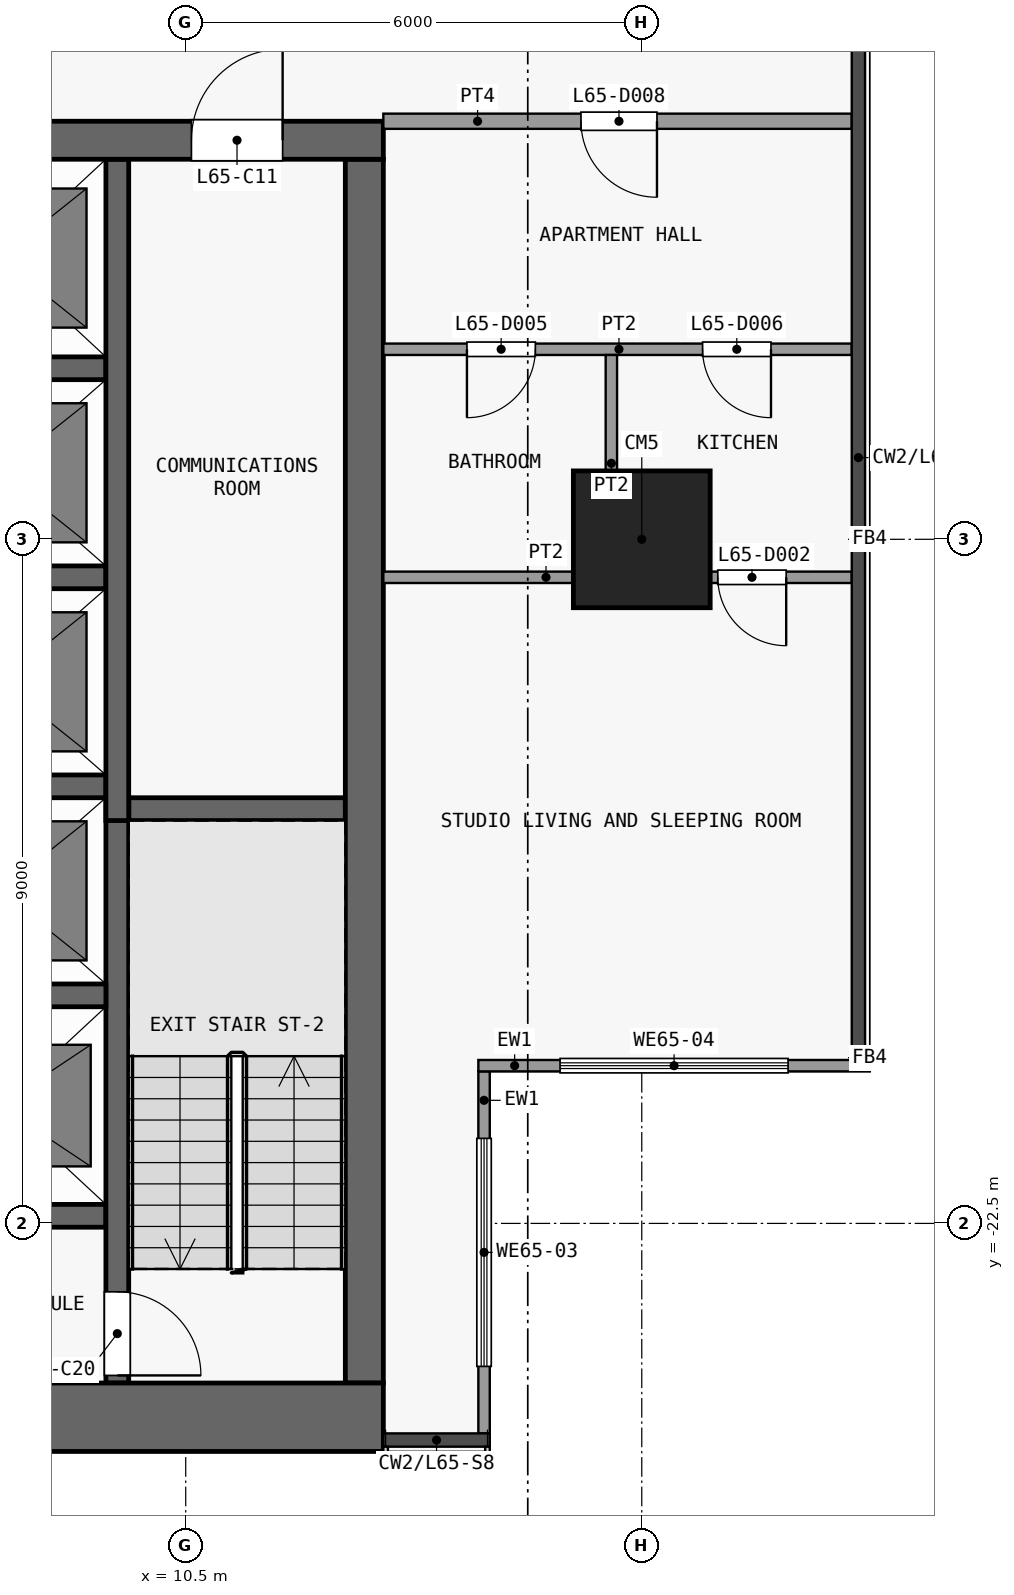
"""IFC4 building model, lengths in metres.
Left out: names, types, materials, properties, quantities, classifications, styles, units other than length and angle.
Written with IfcOpenShell. Run it as: python <this file> out.ifc"""

import sys

from ifc_helpers import new_model, si_unit, direction, frame, frame_2d, origin, origin_2d, place, context, subcontext, project, spatial, rectangle, extrude, element, fill, save


model = new_model("IFC4")
c1 = context("Model", 3, precision=1e-05, world=origin(), true_north=direction((0.0, 1.0)))
c2 = subcontext(c1, "Body", "Model", "MODEL_VIEW")
j1 = project(units=[si_unit("LENGTHUNIT", "METRE"), si_unit("PLANEANGLEUNIT", "RADIAN")], contexts=[c1])
p1 = place(None, origin())
s1 = spatial("IfcSite", under=j1, at=p1, CompositionType="ELEMENT")
p2 = place(p1, origin())
s2 = spatial("IfcBuilding", under=s1, at=p2, CompositionType="ELEMENT")
p3 = place(p2, frame((0.0, 0.0, 259.1)))
s3 = spatial("IfcBuildingStorey", under=s2, at=p3, CompositionType="ELEMENT", Elevation=259.1)
p4 = place(p3, frame((16.5, -13.5, 0.0), z_axis=(0.0, 0.0, 1.0), x_axis=(1.0, 0.0, 0.0)))
e1 = element("IfcColumn", 1, at=p4, inside=s3, PredefinedType="COLUMN", context=c2, shape_type="SweptSolid", body=[
    extrude(rectangle(XDim=1.8, YDim=1.8, at=origin_2d()), origin(), (0.0, 0.0, 1.0), 3.6),
])
p5 = place(p3, frame((-13.1, -25.05, 0.0), z_axis=(0.0, 0.0, 1.0), x_axis=(1.0, 0.0, 0.0)))
e2 = element("IfcWall", 2, at=p5, inside=s3, PredefinedType="SHEAR", context=c2, shape_type="SweptSolid", body=[
    extrude(rectangle(XDim=26.2, YDim=0.9, at=frame_2d((13.1, 0.0))), origin(), (0.0, 0.0, 1.0), 3.3),
])
p6 = place(p3, frame((-13.1, -8.25, 0.0), z_axis=(0.0, 0.0, 1.0), x_axis=(1.0, 0.0, 0.0)))
e3 = element("IfcWall", 3, at=p6, inside=s3, PredefinedType="SHEAR", context=c2, shape_type="SweptSolid", body=[
    extrude(rectangle(XDim=26.2, YDim=0.5, at=frame_2d((13.1, 0.0))), origin(), (0.0, 0.0, 1.0), 3.3),
])
p7 = place(p6, frame((7.4, 0.0, 0.0)))
e4 = element("IfcOpeningElement", 4, at=p7, cuts=e3, PredefinedType="OPENING", context=c2, shape_type="SweptSolid", body=[
    extrude(rectangle(XDim=1.8, YDim=2.1, at=frame_2d((0.9, 1.05))), frame((0.0, 0.26, 0.0), z_axis=(0.0, -1.0, 0.0), x_axis=(1.0, 0.0, 0.0)), (0.0, 0.0, 1.0), 0.52),
])
p8 = place(p6, frame((17.0, 0.0, 0.0)))
e5 = element("IfcOpeningElement", 5, at=p8, cuts=e3, PredefinedType="OPENING", context=c2, shape_type="SweptSolid", body=[
    extrude(rectangle(XDim=1.8, YDim=2.1, at=frame_2d((0.9, 1.05))), frame((0.0, 0.26, 0.0), z_axis=(0.0, -1.0, 0.0), x_axis=(1.0, 0.0, 0.0)), (0.0, 0.0, 1.0), 0.52),
])
p9 = place(p6, frame((2.325, 0.0, 0.0)))
e6 = element("IfcOpeningElement", 6, at=p9, cuts=e3, PredefinedType="OPENING", context=c2, shape_type="SweptSolid", body=[
    extrude(rectangle(XDim=0.9, YDim=2.1, at=frame_2d((0.45, 1.05))), frame((0.0, 0.26, 0.0), z_axis=(0.0, -1.0, 0.0), x_axis=(1.0, 0.0, 0.0)), (0.0, 0.0, 1.0), 0.52),
])
p10 = place(p6, frame((23.675, 0.0, 0.0)))
e7 = element("IfcOpeningElement", 7, at=p10, cuts=e3, PredefinedType="OPENING", context=c2, shape_type="SweptSolid", body=[
    extrude(rectangle(XDim=1.2, YDim=2.1, at=frame_2d((0.6, 1.05))), frame((0.0, 0.26, 0.0), z_axis=(0.0, -1.0, 0.0), x_axis=(1.0, 0.0, 0.0)), (0.0, 0.0, 1.0), 0.52),
])
p11 = place(p3, frame((12.85, -24.6, 0.0), z_axis=(0.0, 0.0, 1.0), x_axis=(0.0, 1.0, 0.0)))
e8 = element("IfcWall", 8, at=p11, inside=s3, PredefinedType="SHEAR", context=c2, shape_type="SweptSolid", body=[
    extrude(rectangle(XDim=16.1, YDim=0.5, at=frame_2d((8.05, 0.0))), origin(), (0.0, 0.0, 1.0), 3.3),
])
for number, where, z_axis, x_axis in (
    (9, (6.65, -22.4, 0.0), (0.0, 0.0, 1.0), (1.0, 0.0, 0.0)),
    (10, (6.65, -19.5, 0.0), (0.0, 0.0, 1.0), (1.0, 0.0, 0.0)),
):
    element("IfcWall", number, at=place(p3, frame(where, z_axis=z_axis, x_axis=x_axis)), inside=s3, PredefinedType="SHEAR", context=c2, shape_type="SweptSolid", body=[
        extrude(rectangle(XDim=2.8, YDim=0.3, at=frame_2d((1.4, 0.0))), origin(), (0.0, 0.0, 1.0), 3.3),
    ])
p12 = place(p3, frame((9.75, -17.05, 0.0), z_axis=(0.0, 0.0, 1.0), x_axis=(1.0, 0.0, 0.0)))
e11 = element("IfcWall", 11, at=p12, inside=s3, PredefinedType="SHEAR", context=c2, shape_type="SweptSolid", body=[
    extrude(rectangle(XDim=2.85, YDim=0.3, at=frame_2d((1.425, 0.0))), origin(), (0.0, 0.0, 1.0), 3.3),
])
for number, where, z_axis, x_axis in (
    (12, (6.65, -16.75, 0.0), (0.0, 0.0, 1.0), (1.0, 0.0, 0.0)),
    (13, (6.65, -14.0, 0.0), (0.0, 0.0, 1.0), (1.0, 0.0, 0.0)),
    (14, (6.65, -11.25, 0.0), (0.0, 0.0, 1.0), (1.0, 0.0, 0.0)),
):
    element("IfcWall", number, at=place(p3, frame(where, z_axis=z_axis, x_axis=x_axis)), inside=s3, PredefinedType="SHEAR", context=c2, shape_type="SweptSolid", body=[
        extrude(rectangle(XDim=2.8, YDim=0.3, at=frame_2d((1.4, 0.0))), origin(), (0.0, 0.0, 1.0), 3.3),
    ])
p13 = place(p3, frame((9.6, -16.9, 0.0), z_axis=(0.0, 0.0, 1.0), x_axis=(0.0, -1.0, 0.0)))
e15 = element("IfcWall", 15, at=p13, inside=s3, PredefinedType="SHEAR", context=c2, shape_type="SweptSolid", body=[
    extrude(rectangle(XDim=7.7, YDim=0.3, at=frame_2d((3.85, 0.0))), origin(), (0.0, 0.0, 1.0), 3.3),
])
p14 = place(p13, frame((6.5, 0.0, 0.0)))
e16 = element("IfcOpeningElement", 16, at=p14, cuts=e15, PredefinedType="OPENING", context=c2, shape_type="SweptSolid", body=[
    extrude(rectangle(XDim=1.1, YDim=2.1, at=frame_2d((0.55, 1.05))), frame((0.0, 0.16, 0.0), z_axis=(0.0, -1.0, 0.0), x_axis=(1.0, 0.0, 0.0)), (0.0, 0.0, 1.0), 0.32),
])
p15 = place(p3, frame((9.6, -17.2, 0.0), z_axis=(0.0, 0.0, 1.0), x_axis=(0.0, 1.0, 0.0)))
e17 = element("IfcWall", 17, at=p15, inside=s3, PredefinedType="SHEAR", context=c2, shape_type="SweptSolid", body=[
    extrude(rectangle(XDim=8.7, YDim=0.3, at=frame_2d((4.35, 0.0))), origin(), (0.0, 0.0, 1.0), 3.3),
])
p16 = place(p3, frame((14.425, -20.5, 0.0), z_axis=(0.0, 0.0, 1.0), x_axis=(0.0, -1.0, 0.0)))
e18 = element("IfcWall", 18, at=p16, inside=s3, PredefinedType="SOLIDWALL", context=c2, shape_type="SweptSolid", body=[
    extrude(rectangle(XDim=4.762, YDim=0.15, at=frame_2d((2.381, 0.0))), origin(), (0.0, 0.0, 1.0), 3.3),
])
p17 = place(p16, frame((0.881, 0.0, 0.9)))
e19 = element("IfcOpeningElement", 19, at=p17, cuts=e18, PredefinedType="OPENING", context=c2, shape_type="SweptSolid", body=[
    extrude(rectangle(XDim=3.0, YDim=2.4, at=frame_2d((1.5, 1.2))), frame((0.0, 0.085, 0.0), z_axis=(0.0, -1.0, 0.0), x_axis=(1.0, 0.0, 0.0)), (0.0, 0.0, 1.0), 0.17),
])
p18 = place(p3, frame((19.5, -20.425, 0.0), z_axis=(0.0, 0.0, 1.0), x_axis=(-1.0, 0.0, 0.0)))
e20 = element("IfcWall", 20, at=p18, inside=s3, PredefinedType="SOLIDWALL", context=c2, shape_type="SweptSolid", body=[
    extrude(rectangle(XDim=5.15, YDim=0.15, at=frame_2d((2.575, 0.0))), origin(), (0.0, 0.0, 1.0), 3.3),
])
p19 = place(p18, frame((1.075, 0.0, 0.9)))
e21 = element("IfcOpeningElement", 21, at=p19, cuts=e20, PredefinedType="OPENING", context=c2, shape_type="SweptSolid", body=[
    extrude(rectangle(XDim=3.0, YDim=2.4, at=frame_2d((1.5, 1.2))), frame((0.0, 0.085, 0.0), z_axis=(0.0, -1.0, 0.0), x_axis=(1.0, 0.0, 0.0)), (0.0, 0.0, 1.0), 0.17),
])
p20 = place(p3, frame((13.1, -14.0, 0.0), z_axis=(0.0, 0.0, 1.0), x_axis=(1.0, 0.0, 0.0)))
e22 = element("IfcWall", 22, at=p20, inside=s3, PredefinedType="PARTITIONING", context=c2, shape_type="SweptSolid", body=[
    extrude(rectangle(XDim=6.162, YDim=0.15, at=frame_2d((3.081, 0.0))), origin(), (0.0, 0.0, 1.0), 3.3),
])
p21 = place(p20, frame((4.4, 0.0, 0.0)))
e23 = element("IfcOpeningElement", 23, at=p21, cuts=e22, PredefinedType="OPENING", context=c2, shape_type="SweptSolid", body=[
    extrude(rectangle(XDim=0.9, YDim=2.1, at=frame_2d((0.45, 1.05))), frame((0.0, 0.085, 0.0), z_axis=(0.0, -1.0, 0.0), x_axis=(1.0, 0.0, 0.0)), (0.0, 0.0, 1.0), 0.17),
])
p22 = place(p3, frame((13.1, -11.0, 0.0), z_axis=(0.0, 0.0, 1.0), x_axis=(1.0, 0.0, 0.0)))
e24 = element("IfcWall", 24, at=p22, inside=s3, PredefinedType="PARTITIONING", context=c2, shape_type="SweptSolid", body=[
    extrude(rectangle(XDim=6.162, YDim=0.15, at=frame_2d((3.081, 0.0))), origin(), (0.0, 0.0, 1.0), 3.3),
])
p23 = place(p22, frame((1.1, 0.0, 0.0)))
e25 = element("IfcOpeningElement", 25, at=p23, cuts=e24, PredefinedType="OPENING", context=c2, shape_type="SweptSolid", body=[
    extrude(rectangle(XDim=0.9, YDim=2.1, at=frame_2d((0.45, 1.05))), frame((0.0, 0.085, 0.0), z_axis=(0.0, -1.0, 0.0), x_axis=(1.0, 0.0, 0.0)), (0.0, 0.0, 1.0), 0.17),
])
p24 = place(p22, frame((4.2, 0.0, 0.0)))
e26 = element("IfcOpeningElement", 26, at=p24, cuts=e24, PredefinedType="OPENING", context=c2, shape_type="SweptSolid", body=[
    extrude(rectangle(XDim=0.9, YDim=2.1, at=frame_2d((0.45, 1.05))), frame((0.0, 0.085, 0.0), z_axis=(0.0, -1.0, 0.0), x_axis=(1.0, 0.0, 0.0)), (0.0, 0.0, 1.0), 0.17),
])
p25 = place(p3, frame((13.1, -8.0, 0.0), z_axis=(0.0, 0.0, 1.0), x_axis=(1.0, 0.0, 0.0)))
e27 = element("IfcWall", 27, at=p25, inside=s3, PredefinedType="PARTITIONING", context=c2, shape_type="SweptSolid", body=[
    extrude(rectangle(XDim=6.162, YDim=0.2, at=frame_2d((3.081, 0.0))), origin(), (0.0, 0.0, 1.0), 3.3),
])
p26 = place(p25, frame((2.6, 0.0, 0.0)))
e28 = element("IfcOpeningElement", 28, at=p26, cuts=e27, PredefinedType="OPENING", context=c2, shape_type="SweptSolid", body=[
    extrude(rectangle(XDim=1.0, YDim=2.1, at=frame_2d((0.5, 1.05))), frame((0.0, 0.11, 0.0), z_axis=(0.0, -1.0, 0.0), x_axis=(1.0, 0.0, 0.0)), (0.0, 0.0, 1.0), 0.22),
])
p27 = place(p3, frame((16.1, -13.925, 0.0), z_axis=(0.0, 0.0, 1.0), x_axis=(0.0, 1.0, 0.0)))
e29 = element("IfcWall", 29, at=p27, inside=s3, PredefinedType="PARTITIONING", context=c2, shape_type="SweptSolid", body=[
    extrude(rectangle(XDim=2.85, YDim=0.15, at=frame_2d((1.425, 0.0))), origin(), (0.0, 0.0, 1.0), 3.3),
])
p28 = place(p10, origin())
e30 = element("IfcDoor", 30, at=p28, inside=s3, OperationType="SINGLE_SWING_RIGHT", PredefinedType="DOOR", context=c2, shape_type="SweptSolid", body=[
    extrude(rectangle(XDim=1.2, YDim=2.1, at=frame_2d((0.6, 1.05))), frame((0.0, 0.025, 0.0), z_axis=(0.0, -1.0, 0.0), x_axis=(1.0, 0.0, 0.0)), (0.0, 0.0, 1.0), 0.05),
])
fill(e7, e30)
p29 = place(p14, origin())
e31 = element("IfcDoor", 31, at=p29, inside=s3, OperationType="SINGLE_SWING_RIGHT", PredefinedType="DOOR", context=c2, shape_type="SweptSolid", body=[
    extrude(rectangle(XDim=1.1, YDim=2.1, at=frame_2d((0.55, 1.05))), frame((0.0, 0.025, 0.0), z_axis=(0.0, -1.0, 0.0), x_axis=(1.0, 0.0, 0.0)), (0.0, 0.0, 1.0), 0.05),
])
fill(e16, e31)
p30 = place(p17, origin())
e32 = element("IfcWindow", 32, at=p30, inside=s3, PartitioningType="SINGLE_PANEL", PredefinedType="WINDOW", context=c2, shape_type="SweptSolid", body=[
    extrude(rectangle(XDim=3.0, YDim=2.4, at=frame_2d((1.5, 1.2))), frame((0.0, 0.03, 0.0), z_axis=(0.0, -1.0, 0.0), x_axis=(1.0, 0.0, 0.0)), (0.0, 0.0, 1.0), 0.06),
])
fill(e19, e32)
p31 = place(p19, origin())
e33 = element("IfcWindow", 33, at=p31, inside=s3, PartitioningType="SINGLE_PANEL", PredefinedType="WINDOW", context=c2, shape_type="SweptSolid", body=[
    extrude(rectangle(XDim=3.0, YDim=2.4, at=frame_2d((1.5, 1.2))), frame((0.0, 0.03, 0.0), z_axis=(0.0, -1.0, 0.0), x_axis=(1.0, 0.0, 0.0)), (0.0, 0.0, 1.0), 0.06),
])
fill(e21, e33)
p32 = place(p21, origin())
e34 = element("IfcDoor", 34, at=p32, inside=s3, OperationType="SINGLE_SWING_RIGHT", PredefinedType="DOOR", context=c2, shape_type="SweptSolid", body=[
    extrude(rectangle(XDim=0.9, YDim=2.1, at=frame_2d((0.45, 1.05))), frame((0.0, 0.025, 0.0), z_axis=(0.0, -1.0, 0.0), x_axis=(1.0, 0.0, 0.0)), (0.0, 0.0, 1.0), 0.05),
])
fill(e23, e34)
p33 = place(p23, origin())
e35 = element("IfcDoor", 35, at=p33, inside=s3, OperationType="SINGLE_SWING_LEFT", PredefinedType="DOOR", context=c2, shape_type="SweptSolid", body=[
    extrude(rectangle(XDim=0.9, YDim=2.1, at=frame_2d((0.45, 1.05))), frame((0.0, 0.025, 0.0), z_axis=(0.0, -1.0, 0.0), x_axis=(1.0, 0.0, 0.0)), (0.0, 0.0, 1.0), 0.05),
])
fill(e25, e35)
p34 = place(p24, origin())
e36 = element("IfcDoor", 36, at=p34, inside=s3, OperationType="SINGLE_SWING_RIGHT", PredefinedType="DOOR", context=c2, shape_type="SweptSolid", body=[
    extrude(rectangle(XDim=0.9, YDim=2.1, at=frame_2d((0.45, 1.05))), frame((0.0, 0.025, 0.0), z_axis=(0.0, -1.0, 0.0), x_axis=(1.0, 0.0, 0.0)), (0.0, 0.0, 1.0), 0.05),
])
fill(e26, e36)
p35 = place(p26, origin())
e37 = element("IfcDoor", 37, at=p35, inside=s3, OperationType="SINGLE_SWING_RIGHT", PredefinedType="DOOR", context=c2, shape_type="SweptSolid", body=[
    extrude(rectangle(XDim=1.0, YDim=2.1, at=frame_2d((0.5, 1.05))), frame((0.0, 0.025, 0.0), z_axis=(0.0, -1.0, 0.0), x_axis=(1.0, 0.0, 0.0)), (0.0, 0.0, 1.0), 0.05),
])
fill(e28, e37)
save(model, sys.argv[1])
